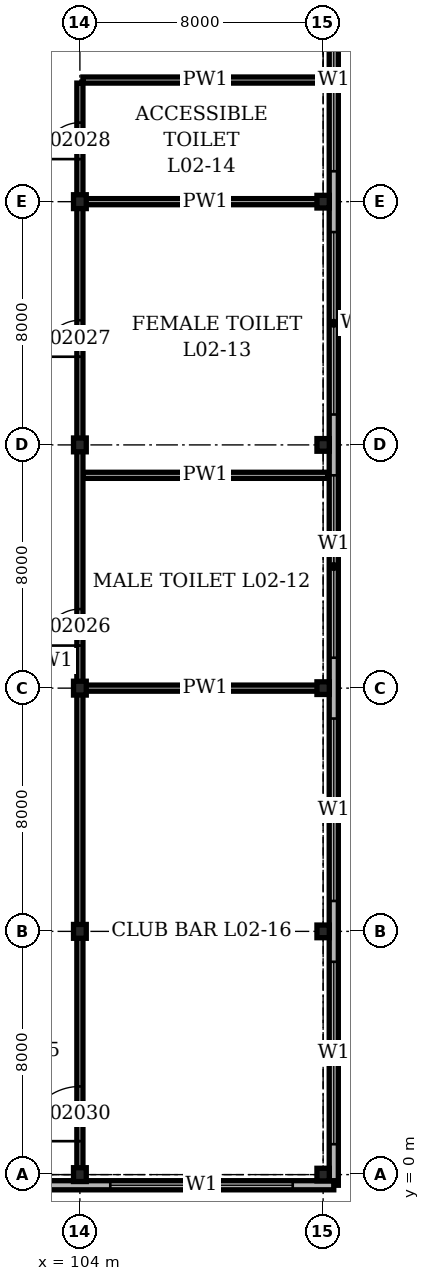
"""IFC4 building model, lengths in metres.
Left out: names, types, materials, properties, quantities, classifications, styles, units other than length and angle.
Written with IfcOpenShell. Run it as: python <this file> out.ifc"""

import sys

from ifc_helpers import new_model, si_unit, direction, frame, frame_2d, origin, origin_2d, place, context, subcontext, project, spatial, rectangle, i_section, extrude, element, fill, save


model = new_model("IFC4")
c1 = context("Model", 3, precision=1e-05, world=origin(), true_north=direction((0.0, 1.0)))
c2 = subcontext(c1, "Body", "Model", "MODEL_VIEW")
j1 = project(units=[si_unit("LENGTHUNIT", "METRE"), si_unit("PLANEANGLEUNIT", "RADIAN")], contexts=[c1])
p1 = place(None, origin())
s1 = spatial("IfcSite", under=j1, at=p1, CompositionType="ELEMENT")
p2 = place(p1, origin())
s2 = spatial("IfcBuilding", under=s1, at=p2, CompositionType="ELEMENT")
p3 = place(p2, frame((0.0, 0.0, 9.9)))
s3 = spatial("IfcBuildingStorey", under=s2, at=p3, CompositionType="ELEMENT", Elevation=9.9)
for number, where, z_axis, x_axis in (
    (1, (104.0, 0.0, 0.0), (0.0, 0.0, 1.0), (1.0, 0.0, 0.0)),
    (2, (104.0, 8.0, 0.0), (0.0, 0.0, 1.0), (1.0, 0.0, 0.0)),
    (3, (104.0, 16.0, 0.0), (0.0, 0.0, 1.0), (1.0, 0.0, 0.0)),
    (4, (104.0, 24.0, 0.0), (0.0, 0.0, 1.0), (1.0, 0.0, 0.0)),
    (5, (104.0, 32.0, 0.0), (0.0, 0.0, 1.0), (1.0, 0.0, 0.0)),
):
    element("IfcColumn", number, at=place(p3, frame(where, z_axis=z_axis, x_axis=x_axis)), inside=s3, PredefinedType="COLUMN", context=c2, shape_type="SweptSolid", body=[
        extrude(i_section(OverallWidth=0.419, OverallDepth=0.455, WebThickness=0.042, FlangeThickness=0.068, at=origin_2d()), origin(), (0.0, 0.0, 1.0), 5.0),
    ])
for number, where, z_axis, x_axis in (
    (6, (112.0, 0.0, 0.0), (0.0, 0.0, 1.0), (1.0, 0.0, 0.0)),
    (7, (112.0, 8.0, 0.0), (0.0, 0.0, 1.0), (1.0, 0.0, 0.0)),
    (8, (112.0, 16.0, 0.0), (0.0, 0.0, 1.0), (1.0, 0.0, 0.0)),
    (9, (112.0, 24.0, 0.0), (0.0, 0.0, 1.0), (1.0, 0.0, 0.0)),
    (10, (112.0, 32.0, 0.0), (0.0, 0.0, 1.0), (1.0, 0.0, 0.0)),
):
    element("IfcColumn", number, at=place(p3, frame(where, z_axis=z_axis, x_axis=x_axis)), inside=s3, PredefinedType="COLUMN", context=c2, shape_type="SweptSolid", body=[
        extrude(i_section(OverallWidth=0.406, OverallDepth=0.417, WebThickness=0.03, FlangeThickness=0.048, at=origin_2d()), origin(), (0.0, 0.0, 1.0), 5.0),
    ])
p4 = place(p3, frame((-0.35, -0.35, 0.0), z_axis=(0.0, 0.0, 1.0), x_axis=(1.0, 0.0, 0.0)))
e11 = element("IfcWall", 11, at=p4, inside=s3, PredefinedType="SOLIDWALL", context=c2, shape_type="SweptSolid", body=[
    extrude(rectangle(XDim=112.7, YDim=0.3, at=frame_2d((56.35, 0.0))), origin(), (0.0, 0.0, 1.0), 5.0),
])
p5 = place(p4, frame((1.35, 0.0, 1.0)))
e12 = element("IfcOpeningElement", 12, at=p5, cuts=e11, PredefinedType="OPENING", context=c2, shape_type="SweptSolid", body=[
    extrude(rectangle(XDim=6.0, YDim=1.5, at=frame_2d((3.0, 0.75))), frame((0.0, 0.16, 0.0), z_axis=(0.0, -1.0, 0.0), x_axis=(1.0, 0.0, 0.0)), (0.0, 0.0, 1.0), 0.32),
])
p6 = place(p4, frame((9.35, 0.0, 1.0)))
e13 = element("IfcOpeningElement", 13, at=p6, cuts=e11, PredefinedType="OPENING", context=c2, shape_type="SweptSolid", body=[
    extrude(rectangle(XDim=6.0, YDim=1.5, at=frame_2d((3.0, 0.75))), frame((0.0, 0.16, 0.0), z_axis=(0.0, -1.0, 0.0), x_axis=(1.0, 0.0, 0.0)), (0.0, 0.0, 1.0), 0.32),
])
p7 = place(p4, frame((17.35, 0.0, 1.0)))
e14 = element("IfcOpeningElement", 14, at=p7, cuts=e11, PredefinedType="OPENING", context=c2, shape_type="SweptSolid", body=[
    extrude(rectangle(XDim=6.0, YDim=1.5, at=frame_2d((3.0, 0.75))), frame((0.0, 0.16, 0.0), z_axis=(0.0, -1.0, 0.0), x_axis=(1.0, 0.0, 0.0)), (0.0, 0.0, 1.0), 0.32),
])
p8 = place(p4, frame((25.35, 0.0, 1.0)))
e15 = element("IfcOpeningElement", 15, at=p8, cuts=e11, PredefinedType="OPENING", context=c2, shape_type="SweptSolid", body=[
    extrude(rectangle(XDim=6.0, YDim=1.5, at=frame_2d((3.0, 0.75))), frame((0.0, 0.16, 0.0), z_axis=(0.0, -1.0, 0.0), x_axis=(1.0, 0.0, 0.0)), (0.0, 0.0, 1.0), 0.32),
])
p9 = place(p4, frame((33.35, 0.0, 1.0)))
e16 = element("IfcOpeningElement", 16, at=p9, cuts=e11, PredefinedType="OPENING", context=c2, shape_type="SweptSolid", body=[
    extrude(rectangle(XDim=6.0, YDim=1.5, at=frame_2d((3.0, 0.75))), frame((0.0, 0.16, 0.0), z_axis=(0.0, -1.0, 0.0), x_axis=(1.0, 0.0, 0.0)), (0.0, 0.0, 1.0), 0.32),
])
p10 = place(p4, frame((41.35, 0.0, 1.0)))
e17 = element("IfcOpeningElement", 17, at=p10, cuts=e11, PredefinedType="OPENING", context=c2, shape_type="SweptSolid", body=[
    extrude(rectangle(XDim=6.0, YDim=1.5, at=frame_2d((3.0, 0.75))), frame((0.0, 0.16, 0.0), z_axis=(0.0, -1.0, 0.0), x_axis=(1.0, 0.0, 0.0)), (0.0, 0.0, 1.0), 0.32),
])
p11 = place(p4, frame((49.35, 0.0, 1.0)))
e18 = element("IfcOpeningElement", 18, at=p11, cuts=e11, PredefinedType="OPENING", context=c2, shape_type="SweptSolid", body=[
    extrude(rectangle(XDim=6.0, YDim=1.5, at=frame_2d((3.0, 0.75))), frame((0.0, 0.16, 0.0), z_axis=(0.0, -1.0, 0.0), x_axis=(1.0, 0.0, 0.0)), (0.0, 0.0, 1.0), 0.32),
])
p12 = place(p4, frame((57.35, 0.0, 1.0)))
e19 = element("IfcOpeningElement", 19, at=p12, cuts=e11, PredefinedType="OPENING", context=c2, shape_type="SweptSolid", body=[
    extrude(rectangle(XDim=6.0, YDim=1.5, at=frame_2d((3.0, 0.75))), frame((0.0, 0.16, 0.0), z_axis=(0.0, -1.0, 0.0), x_axis=(1.0, 0.0, 0.0)), (0.0, 0.0, 1.0), 0.32),
])
p13 = place(p4, frame((65.35, 0.0, 1.0)))
e20 = element("IfcOpeningElement", 20, at=p13, cuts=e11, PredefinedType="OPENING", context=c2, shape_type="SweptSolid", body=[
    extrude(rectangle(XDim=6.0, YDim=1.5, at=frame_2d((3.0, 0.75))), frame((0.0, 0.16, 0.0), z_axis=(0.0, -1.0, 0.0), x_axis=(1.0, 0.0, 0.0)), (0.0, 0.0, 1.0), 0.32),
])
p14 = place(p4, frame((73.35, 0.0, 1.0)))
e21 = element("IfcOpeningElement", 21, at=p14, cuts=e11, PredefinedType="OPENING", context=c2, shape_type="SweptSolid", body=[
    extrude(rectangle(XDim=6.0, YDim=1.5, at=frame_2d((3.0, 0.75))), frame((0.0, 0.16, 0.0), z_axis=(0.0, -1.0, 0.0), x_axis=(1.0, 0.0, 0.0)), (0.0, 0.0, 1.0), 0.32),
])
p15 = place(p4, frame((81.35, 0.0, 1.0)))
e22 = element("IfcOpeningElement", 22, at=p15, cuts=e11, PredefinedType="OPENING", context=c2, shape_type="SweptSolid", body=[
    extrude(rectangle(XDim=6.0, YDim=1.5, at=frame_2d((3.0, 0.75))), frame((0.0, 0.16, 0.0), z_axis=(0.0, -1.0, 0.0), x_axis=(1.0, 0.0, 0.0)), (0.0, 0.0, 1.0), 0.32),
])
p16 = place(p4, frame((89.35, 0.0, 1.0)))
e23 = element("IfcOpeningElement", 23, at=p16, cuts=e11, PredefinedType="OPENING", context=c2, shape_type="SweptSolid", body=[
    extrude(rectangle(XDim=6.0, YDim=1.5, at=frame_2d((3.0, 0.75))), frame((0.0, 0.16, 0.0), z_axis=(0.0, -1.0, 0.0), x_axis=(1.0, 0.0, 0.0)), (0.0, 0.0, 1.0), 0.32),
])
p17 = place(p4, frame((97.35, 0.0, 1.0)))
e24 = element("IfcOpeningElement", 24, at=p17, cuts=e11, PredefinedType="OPENING", context=c2, shape_type="SweptSolid", body=[
    extrude(rectangle(XDim=6.0, YDim=1.5, at=frame_2d((3.0, 0.75))), frame((0.0, 0.16, 0.0), z_axis=(0.0, -1.0, 0.0), x_axis=(1.0, 0.0, 0.0)), (0.0, 0.0, 1.0), 0.32),
])
p18 = place(p4, frame((105.35, 0.0, 1.0)))
e25 = element("IfcOpeningElement", 25, at=p18, cuts=e11, PredefinedType="OPENING", context=c2, shape_type="SweptSolid", body=[
    extrude(rectangle(XDim=6.0, YDim=1.5, at=frame_2d((3.0, 0.75))), frame((0.0, 0.16, 0.0), z_axis=(0.0, -1.0, 0.0), x_axis=(1.0, 0.0, 0.0)), (0.0, 0.0, 1.0), 0.32),
])
p19 = place(p3, frame((112.35, -0.35, 0.0), z_axis=(0.0, 0.0, 1.0), x_axis=(0.0, 1.0, 0.0)))
e26 = element("IfcWall", 26, at=p19, inside=s3, PredefinedType="SOLIDWALL", context=c2, shape_type="SweptSolid", body=[
    extrude(rectangle(XDim=112.7, YDim=0.3, at=frame_2d((56.35, 0.0))), origin(), (0.0, 0.0, 1.0), 5.0),
])
p20 = place(p19, frame((1.35, 0.0, 1.0)))
e27 = element("IfcOpeningElement", 27, at=p20, cuts=e26, PredefinedType="OPENING", context=c2, shape_type="SweptSolid", body=[
    extrude(rectangle(XDim=6.0, YDim=1.5, at=frame_2d((3.0, 0.75))), frame((0.0, 0.16, 0.0), z_axis=(0.0, -1.0, 0.0), x_axis=(1.0, 0.0, 0.0)), (0.0, 0.0, 1.0), 0.32),
])
p21 = place(p19, frame((9.35, 0.0, 1.0)))
e28 = element("IfcOpeningElement", 28, at=p21, cuts=e26, PredefinedType="OPENING", context=c2, shape_type="SweptSolid", body=[
    extrude(rectangle(XDim=6.0, YDim=1.5, at=frame_2d((3.0, 0.75))), frame((0.0, 0.16, 0.0), z_axis=(0.0, -1.0, 0.0), x_axis=(1.0, 0.0, 0.0)), (0.0, 0.0, 1.0), 0.32),
])
p22 = place(p19, frame((17.35, 0.0, 1.0)))
e29 = element("IfcOpeningElement", 29, at=p22, cuts=e26, PredefinedType="OPENING", context=c2, shape_type="SweptSolid", body=[
    extrude(rectangle(XDim=6.0, YDim=1.5, at=frame_2d((3.0, 0.75))), frame((0.0, 0.16, 0.0), z_axis=(0.0, -1.0, 0.0), x_axis=(1.0, 0.0, 0.0)), (0.0, 0.0, 1.0), 0.32),
])
p23 = place(p19, frame((25.35, 0.0, 1.0)))
e30 = element("IfcOpeningElement", 30, at=p23, cuts=e26, PredefinedType="OPENING", context=c2, shape_type="SweptSolid", body=[
    extrude(rectangle(XDim=6.0, YDim=1.5, at=frame_2d((3.0, 0.75))), frame((0.0, 0.16, 0.0), z_axis=(0.0, -1.0, 0.0), x_axis=(1.0, 0.0, 0.0)), (0.0, 0.0, 1.0), 0.32),
])
p24 = place(p19, frame((33.35, 0.0, 1.0)))
e31 = element("IfcOpeningElement", 31, at=p24, cuts=e26, PredefinedType="OPENING", context=c2, shape_type="SweptSolid", body=[
    extrude(rectangle(XDim=6.0, YDim=1.5, at=frame_2d((3.0, 0.75))), frame((0.0, 0.16, 0.0), z_axis=(0.0, -1.0, 0.0), x_axis=(1.0, 0.0, 0.0)), (0.0, 0.0, 1.0), 0.32),
])
p25 = place(p19, frame((41.35, 0.0, 1.0)))
e32 = element("IfcOpeningElement", 32, at=p25, cuts=e26, PredefinedType="OPENING", context=c2, shape_type="SweptSolid", body=[
    extrude(rectangle(XDim=6.0, YDim=1.5, at=frame_2d((3.0, 0.75))), frame((0.0, 0.16, 0.0), z_axis=(0.0, -1.0, 0.0), x_axis=(1.0, 0.0, 0.0)), (0.0, 0.0, 1.0), 0.32),
])
p26 = place(p19, frame((49.35, 0.0, 1.0)))
e33 = element("IfcOpeningElement", 33, at=p26, cuts=e26, PredefinedType="OPENING", context=c2, shape_type="SweptSolid", body=[
    extrude(rectangle(XDim=6.0, YDim=1.5, at=frame_2d((3.0, 0.75))), frame((0.0, 0.16, 0.0), z_axis=(0.0, -1.0, 0.0), x_axis=(1.0, 0.0, 0.0)), (0.0, 0.0, 1.0), 0.32),
])
p27 = place(p19, frame((57.35, 0.0, 1.0)))
e34 = element("IfcOpeningElement", 34, at=p27, cuts=e26, PredefinedType="OPENING", context=c2, shape_type="SweptSolid", body=[
    extrude(rectangle(XDim=6.0, YDim=1.5, at=frame_2d((3.0, 0.75))), frame((0.0, 0.16, 0.0), z_axis=(0.0, -1.0, 0.0), x_axis=(1.0, 0.0, 0.0)), (0.0, 0.0, 1.0), 0.32),
])
p28 = place(p19, frame((65.35, 0.0, 1.0)))
e35 = element("IfcOpeningElement", 35, at=p28, cuts=e26, PredefinedType="OPENING", context=c2, shape_type="SweptSolid", body=[
    extrude(rectangle(XDim=6.0, YDim=1.5, at=frame_2d((3.0, 0.75))), frame((0.0, 0.16, 0.0), z_axis=(0.0, -1.0, 0.0), x_axis=(1.0, 0.0, 0.0)), (0.0, 0.0, 1.0), 0.32),
])
p29 = place(p19, frame((73.35, 0.0, 1.0)))
e36 = element("IfcOpeningElement", 36, at=p29, cuts=e26, PredefinedType="OPENING", context=c2, shape_type="SweptSolid", body=[
    extrude(rectangle(XDim=6.0, YDim=1.5, at=frame_2d((3.0, 0.75))), frame((0.0, 0.16, 0.0), z_axis=(0.0, -1.0, 0.0), x_axis=(1.0, 0.0, 0.0)), (0.0, 0.0, 1.0), 0.32),
])
p30 = place(p19, frame((81.35, 0.0, 1.0)))
e37 = element("IfcOpeningElement", 37, at=p30, cuts=e26, PredefinedType="OPENING", context=c2, shape_type="SweptSolid", body=[
    extrude(rectangle(XDim=6.0, YDim=1.5, at=frame_2d((3.0, 0.75))), frame((0.0, 0.16, 0.0), z_axis=(0.0, -1.0, 0.0), x_axis=(1.0, 0.0, 0.0)), (0.0, 0.0, 1.0), 0.32),
])
p31 = place(p19, frame((89.35, 0.0, 1.0)))
e38 = element("IfcOpeningElement", 38, at=p31, cuts=e26, PredefinedType="OPENING", context=c2, shape_type="SweptSolid", body=[
    extrude(rectangle(XDim=6.0, YDim=1.5, at=frame_2d((3.0, 0.75))), frame((0.0, 0.16, 0.0), z_axis=(0.0, -1.0, 0.0), x_axis=(1.0, 0.0, 0.0)), (0.0, 0.0, 1.0), 0.32),
])
p32 = place(p19, frame((97.35, 0.0, 1.0)))
e39 = element("IfcOpeningElement", 39, at=p32, cuts=e26, PredefinedType="OPENING", context=c2, shape_type="SweptSolid", body=[
    extrude(rectangle(XDim=6.0, YDim=1.5, at=frame_2d((3.0, 0.75))), frame((0.0, 0.16, 0.0), z_axis=(0.0, -1.0, 0.0), x_axis=(1.0, 0.0, 0.0)), (0.0, 0.0, 1.0), 0.32),
])
p33 = place(p19, frame((105.35, 0.0, 1.0)))
e40 = element("IfcOpeningElement", 40, at=p33, cuts=e26, PredefinedType="OPENING", context=c2, shape_type="SweptSolid", body=[
    extrude(rectangle(XDim=6.0, YDim=1.5, at=frame_2d((3.0, 0.75))), frame((0.0, 0.16, 0.0), z_axis=(0.0, -1.0, 0.0), x_axis=(1.0, 0.0, 0.0)), (0.0, 0.0, 1.0), 0.32),
])
p34 = place(p3, frame((104.1, 16.0, 0.0), z_axis=(0.0, 0.0, 1.0), x_axis=(1.0, 0.0, 0.0)))
e41 = element("IfcWall", 41, at=p34, inside=s3, PredefinedType="PARTITIONING", context=c2, shape_type="SweptSolid", body=[
    extrude(rectangle(XDim=8.05, YDim=0.2, at=frame_2d((4.025, 0.0))), origin(), (0.0, 0.0, 1.0), 4.028),
])
p35 = place(p3, frame((104.1, 23.0, 0.0), z_axis=(0.0, 0.0, 1.0), x_axis=(1.0, 0.0, 0.0)))
e42 = element("IfcWall", 42, at=p35, inside=s3, PredefinedType="PARTITIONING", context=c2, shape_type="SweptSolid", body=[
    extrude(rectangle(XDim=8.05, YDim=0.2, at=frame_2d((4.025, 0.0))), origin(), (0.0, 0.0, 1.0), 4.8),
])
p36 = place(p3, frame((104.1, 32.0, 0.0), z_axis=(0.0, 0.0, 1.0), x_axis=(1.0, 0.0, 0.0)))
e43 = element("IfcWall", 43, at=p36, inside=s3, PredefinedType="PARTITIONING", context=c2, shape_type="SweptSolid", body=[
    extrude(rectangle(XDim=8.05, YDim=0.2, at=frame_2d((4.025, 0.0))), origin(), (0.0, 0.0, 1.0), 4.028),
])
p37 = place(p3, frame((104.1, 36.0, 0.0), z_axis=(0.0, 0.0, 1.0), x_axis=(1.0, 0.0, 0.0)))
e44 = element("IfcWall", 44, at=p37, inside=s3, PredefinedType="PARTITIONING", context=c2, shape_type="SweptSolid", body=[
    extrude(rectangle(XDim=8.05, YDim=0.2, at=frame_2d((4.025, 0.0))), origin(), (0.0, 0.0, 1.0), 4.8),
])
p38 = place(p3, frame((104.0, -0.15, 0.0), z_axis=(0.0, 0.0, 1.0), x_axis=(0.0, 1.0, 0.0)))
e45 = element("IfcWall", 45, at=p38, inside=s3, PredefinedType="PARTITIONING", context=c2, shape_type="SweptSolid", body=[
    extrude(rectangle(XDim=36.05, YDim=0.2, at=frame_2d((18.025, 0.0))), origin(), (0.0, 0.0, 1.0), 4.028),
])
p39 = place(p38, frame((17.55, 0.0, 0.0)))
e46 = element("IfcOpeningElement", 46, at=p39, cuts=e45, PredefinedType="OPENING", context=c2, shape_type="SweptSolid", body=[
    extrude(rectangle(XDim=1.2, YDim=2.1, at=frame_2d((0.6, 1.05))), frame((0.0, 0.11, 0.0), z_axis=(0.0, -1.0, 0.0), x_axis=(1.0, 0.0, 0.0)), (0.0, 0.0, 1.0), 0.22),
])
p40 = place(p38, frame((27.05, 0.0, 0.0)))
e47 = element("IfcOpeningElement", 47, at=p40, cuts=e45, PredefinedType="OPENING", context=c2, shape_type="SweptSolid", body=[
    extrude(rectangle(XDim=1.2, YDim=2.1, at=frame_2d((0.6, 1.05))), frame((0.0, 0.11, 0.0), z_axis=(0.0, -1.0, 0.0), x_axis=(1.0, 0.0, 0.0)), (0.0, 0.0, 1.0), 0.22),
])
p41 = place(p38, frame((33.55, 0.0, 0.0)))
e48 = element("IfcOpeningElement", 48, at=p41, cuts=e45, PredefinedType="OPENING", context=c2, shape_type="SweptSolid", body=[
    extrude(rectangle(XDim=1.2, YDim=2.1, at=frame_2d((0.6, 1.05))), frame((0.0, 0.11, 0.0), z_axis=(0.0, -1.0, 0.0), x_axis=(1.0, 0.0, 0.0)), (0.0, 0.0, 1.0), 0.22),
])
p42 = place(p38, frame((1.25, 0.0, 0.0)))
e49 = element("IfcOpeningElement", 49, at=p42, cuts=e45, PredefinedType="OPENING", context=c2, shape_type="SweptSolid", body=[
    extrude(rectangle(XDim=1.8, YDim=2.4, at=frame_2d((0.9, 1.2))), frame((0.0, 0.11, 0.0), z_axis=(0.0, -1.0, 0.0), x_axis=(1.0, 0.0, 0.0)), (0.0, 0.0, 1.0), 0.22),
])
p43 = place(p18, origin())
e50 = element("IfcWindow", 50, at=p43, inside=s3, PartitioningType="SINGLE_PANEL", PredefinedType="WINDOW", context=c2, shape_type="SweptSolid", body=[
    extrude(rectangle(XDim=6.0, YDim=1.5, at=frame_2d((3.0, 0.75))), frame((0.0, 0.03, 0.0), z_axis=(0.0, -1.0, 0.0), x_axis=(1.0, 0.0, 0.0)), (0.0, 0.0, 1.0), 0.06),
])
fill(e25, e50)
p44 = place(p20, origin())
e51 = element("IfcWindow", 51, at=p44, inside=s3, PartitioningType="SINGLE_PANEL", PredefinedType="WINDOW", context=c2, shape_type="SweptSolid", body=[
    extrude(rectangle(XDim=6.0, YDim=1.5, at=frame_2d((3.0, 0.75))), frame((0.0, 0.03, 0.0), z_axis=(0.0, -1.0, 0.0), x_axis=(1.0, 0.0, 0.0)), (0.0, 0.0, 1.0), 0.06),
])
fill(e27, e51)
p45 = place(p21, origin())
e52 = element("IfcWindow", 52, at=p45, inside=s3, PartitioningType="SINGLE_PANEL", PredefinedType="WINDOW", context=c2, shape_type="SweptSolid", body=[
    extrude(rectangle(XDim=6.0, YDim=1.5, at=frame_2d((3.0, 0.75))), frame((0.0, 0.03, 0.0), z_axis=(0.0, -1.0, 0.0), x_axis=(1.0, 0.0, 0.0)), (0.0, 0.0, 1.0), 0.06),
])
fill(e28, e52)
p46 = place(p22, origin())
e53 = element("IfcWindow", 53, at=p46, inside=s3, PartitioningType="SINGLE_PANEL", PredefinedType="WINDOW", context=c2, shape_type="SweptSolid", body=[
    extrude(rectangle(XDim=6.0, YDim=1.5, at=frame_2d((3.0, 0.75))), frame((0.0, 0.03, 0.0), z_axis=(0.0, -1.0, 0.0), x_axis=(1.0, 0.0, 0.0)), (0.0, 0.0, 1.0), 0.06),
])
fill(e29, e53)
p47 = place(p23, origin())
e54 = element("IfcWindow", 54, at=p47, inside=s3, PartitioningType="SINGLE_PANEL", PredefinedType="WINDOW", context=c2, shape_type="SweptSolid", body=[
    extrude(rectangle(XDim=6.0, YDim=1.5, at=frame_2d((3.0, 0.75))), frame((0.0, 0.03, 0.0), z_axis=(0.0, -1.0, 0.0), x_axis=(1.0, 0.0, 0.0)), (0.0, 0.0, 1.0), 0.06),
])
fill(e30, e54)
p48 = place(p24, origin())
e55 = element("IfcWindow", 55, at=p48, inside=s3, PartitioningType="SINGLE_PANEL", PredefinedType="WINDOW", context=c2, shape_type="SweptSolid", body=[
    extrude(rectangle(XDim=6.0, YDim=1.5, at=frame_2d((3.0, 0.75))), frame((0.0, 0.03, 0.0), z_axis=(0.0, -1.0, 0.0), x_axis=(1.0, 0.0, 0.0)), (0.0, 0.0, 1.0), 0.06),
])
fill(e31, e55)
p49 = place(p39, origin())
e56 = element("IfcDoor", 56, at=p49, inside=s3, OperationType="SINGLE_SWING_RIGHT", PredefinedType="DOOR", context=c2, shape_type="SweptSolid", body=[
    extrude(rectangle(XDim=1.2, YDim=2.1, at=frame_2d((0.6, 1.05))), frame((0.0, 0.1, 0.0), z_axis=(0.0, -1.0, 0.0), x_axis=(1.0, 0.0, 0.0)), (0.0, 0.0, 1.0), 0.199),
])
fill(e46, e56)
p50 = place(p40, origin())
e57 = element("IfcDoor", 57, at=p50, inside=s3, OperationType="SINGLE_SWING_RIGHT", PredefinedType="DOOR", context=c2, shape_type="SweptSolid", body=[
    extrude(rectangle(XDim=1.2, YDim=2.1, at=frame_2d((0.6, 1.05))), frame((0.0, 0.1, 0.0), z_axis=(0.0, -1.0, 0.0), x_axis=(1.0, 0.0, 0.0)), (0.0, 0.0, 1.0), 0.199),
])
fill(e47, e57)
p51 = place(p41, origin())
e58 = element("IfcDoor", 58, at=p51, inside=s3, OperationType="SINGLE_SWING_RIGHT", PredefinedType="DOOR", context=c2, shape_type="SweptSolid", body=[
    extrude(rectangle(XDim=1.2, YDim=2.1, at=frame_2d((0.6, 1.05))), frame((0.0, 0.1, 0.0), z_axis=(0.0, -1.0, 0.0), x_axis=(1.0, 0.0, 0.0)), (0.0, 0.0, 1.0), 0.199),
])
fill(e48, e58)
p52 = place(p42, origin())
e59 = element("IfcDoor", 59, at=p52, inside=s3, OperationType="DOUBLE_DOOR_DOUBLE_SWING", PredefinedType="DOOR", context=c2, shape_type="SweptSolid", body=[
    extrude(rectangle(XDim=1.8, YDim=2.4, at=frame_2d((0.9, 1.2))), frame((0.0, 0.1, 0.0), z_axis=(0.0, -1.0, 0.0), x_axis=(1.0, 0.0, 0.0)), (0.0, 0.0, 1.0), 0.199),
])
fill(e49, e59)
save(model, sys.argv[1])
